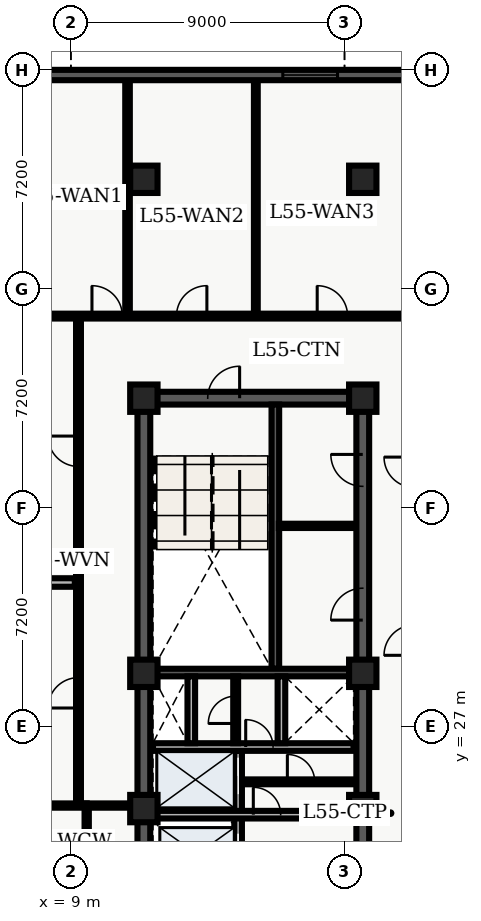
"""IFC4 building model, lengths in metres.
Left out: names, types, materials, properties, quantities, classifications, styles, units other than length and angle.
Written with IfcOpenShell. Run it as: python <this file> out.ifc"""

import sys

from ifc_helpers import new_model, entity, si_unit, converted_unit, direction, frame, origin_with_axes, origin_2d_with_axis, place, context, subcontext, project, spatial, polyline, rectangle, outline, extrude, element, fill, save


model = new_model("IFC4")
c1 = context("Model", 3, precision=1e-05, world=origin_with_axes(), true_north=direction((0.0, 1.0)))
c2 = subcontext(c1, "Body", "Model", "MODEL_VIEW")
j1 = project(units=[si_unit("LENGTHUNIT", "METRE"), converted_unit("PLANEANGLEUNIT", "DEGREE", entity("IfcPlaneAngleMeasure", 0.017), si_unit("PLANEANGLEUNIT", "RADIAN"), dimensions=[0, 0, 0, 0, 0, 0, 0])], contexts=[c1])
p1 = place(None, origin_with_axes())
s1 = spatial("IfcSite", under=j1, at=p1, CompositionType="ELEMENT")
p2 = place(p1, origin_with_axes())
s2 = spatial("IfcBuilding", under=s1, at=p2, CompositionType="ELEMENT")
p3 = place(p2, frame((0.0, 0.0, 224.7), z_axis=(0.0, 0.0, 1.0), x_axis=(1.0, 0.0, 0.0)))
s3 = spatial("IfcBuildingStorey", under=s2, at=p3, CompositionType="ELEMENT", Elevation=224.7)
p4 = place(p3, frame((11.4, 10.8, 0.0), z_axis=(0.0, 0.0, 1.0), x_axis=(0.0, 1.0, 0.0)))
e1 = element("IfcWall", 1, at=p4, inside=s3, PredefinedType="SHEAR", context=c2, shape_type="SweptSolid", body=[
    extrude(outline(polyline([(0.0, -0.21), (27.0, -0.21), (27.0, 0.21), (0.0, 0.21), (0.0, -0.21)])), origin_with_axes(), (0.0, 0.0, 1.0), 3.66),
])
p5 = place(p3, frame((11.4, 37.8, 0.0), z_axis=(0.0, 0.0, 1.0), x_axis=(1.0, 0.0, 0.0)))
e2 = element("IfcWall", 2, at=p5, inside=s3, PredefinedType="SHEAR", context=c2, shape_type="SweptSolid", body=[
    extrude(outline(polyline([(0.0, -0.21), (7.2, -0.21), (7.2, 0.21), (0.0, 0.21), (0.0, -0.21)])), origin_with_axes(), (0.0, 0.0, 1.0), 3.66),
])
p6 = place(p5, frame((2.625, 0.0, 0.0), z_axis=(0.0, 0.0, 1.0), x_axis=(1.0, 0.0, 0.0)))
e3 = element("IfcOpeningElement", 3, at=p6, cuts=e2, PredefinedType="OPENING", context=c2, shape_type="SweptSolid", body=[
    extrude(rectangle(XDim=1.05, YDim=0.44, at=origin_2d_with_axis()), origin_with_axes(), (0.0, 0.0, 1.0), 2.15),
])
p7 = place(p3, frame((18.6, 10.8, 0.0), z_axis=(0.0, 0.0, 1.0), x_axis=(0.0, 1.0, 0.0)))
e4 = element("IfcWall", 4, at=p7, inside=s3, PredefinedType="SHEAR", context=c2, shape_type="SweptSolid", body=[
    extrude(outline(polyline([(0.0, -0.21), (13.5, -0.21), (13.5, 0.21), (0.0, 0.21), (0.0, -0.21)])), origin_with_axes(), (0.0, 0.0, 1.0), 3.66),
])
p8 = place(p7, frame((1.3, 0.0, 0.0), z_axis=(0.0, 0.0, 1.0), x_axis=(1.0, 0.0, 0.0)))
e5 = element("IfcOpeningElement", 5, at=p8, cuts=e4, PredefinedType="OPENING", context=c2, shape_type="SweptSolid", body=[
    extrude(rectangle(XDim=1.1, YDim=0.44, at=origin_2d_with_axis()), origin_with_axes(), (0.0, 0.0, 1.0), 2.15),
])
p9 = place(p7, frame((3.4, 0.0, 0.0), z_axis=(0.0, 0.0, 1.0), x_axis=(1.0, 0.0, 0.0)))
e6 = element("IfcOpeningElement", 6, at=p9, cuts=e4, PredefinedType="OPENING", context=c2, shape_type="SweptSolid", body=[
    extrude(rectangle(XDim=1.1, YDim=0.44, at=origin_2d_with_axis()), origin_with_axes(), (0.0, 0.0, 1.0), 2.15),
])
p10 = place(p7, frame((11.125, 0.0, 0.0), z_axis=(0.0, 0.0, 1.0), x_axis=(1.0, 0.0, 0.0)))
e7 = element("IfcOpeningElement", 7, at=p10, cuts=e4, PredefinedType="OPENING", context=c2, shape_type="SweptSolid", body=[
    extrude(rectangle(XDim=1.05, YDim=0.44, at=origin_2d_with_axis()), origin_with_axes(), (0.0, 0.0, 1.0), 2.15),
])
p11 = place(p7, frame((6.675, 0.0, 0.0), z_axis=(0.0, 0.0, 1.0), x_axis=(1.0, 0.0, 0.0)))
e8 = element("IfcOpeningElement", 8, at=p11, cuts=e4, PredefinedType="OPENING", context=c2, shape_type="SweptSolid", body=[
    extrude(rectangle(XDim=0.95, YDim=0.44, at=origin_2d_with_axis()), origin_with_axes(), (0.0, 0.0, 1.0), 2.15),
])
p12 = place(p3, frame((18.6, 24.3, 0.0), z_axis=(0.0, 0.0, 1.0), x_axis=(0.0, 1.0, 0.0)))
e9 = element("IfcWall", 9, at=p12, inside=s3, PredefinedType="SHEAR", context=c2, shape_type="SweptSolid", body=[
    extrude(outline(polyline([(0.0, -0.21), (13.5, -0.21), (13.5, 0.21), (0.0, 0.21), (0.0, -0.21)])), origin_with_axes(), (0.0, 0.0, 1.0), 3.66),
])
p13 = place(p12, frame((6.725, 0.0, 0.0), z_axis=(0.0, 0.0, 1.0), x_axis=(1.0, 0.0, 0.0)))
e10 = element("IfcOpeningElement", 10, at=p13, cuts=e9, PredefinedType="OPENING", context=c2, shape_type="SweptSolid", body=[
    extrude(rectangle(XDim=1.05, YDim=0.44, at=origin_2d_with_axis()), origin_with_axes(), (0.0, 0.0, 1.0), 2.15),
])
p14 = place(p12, frame((11.125, 0.0, 0.0), z_axis=(0.0, 0.0, 1.0), x_axis=(1.0, 0.0, 0.0)))
e11 = element("IfcOpeningElement", 11, at=p14, cuts=e9, PredefinedType="OPENING", context=c2, shape_type="SweptSolid", body=[
    extrude(rectangle(XDim=1.05, YDim=0.44, at=origin_2d_with_axis()), origin_with_axes(), (0.0, 0.0, 1.0), 2.15),
])
p15 = place(p3, frame((15.725, 28.9, 0.0), z_axis=(0.0, 0.0, 1.0), x_axis=(0.0, 1.0, 0.0)))
e12 = element("IfcWall", 12, at=p15, inside=s3, PredefinedType="SHEAR", context=c2, shape_type="SweptSolid", body=[
    extrude(outline(polyline([(0.0, -0.125), (8.69, -0.125), (8.69, 0.125), (0.0, 0.125), (0.0, -0.125)])), origin_with_axes(), (0.0, 0.0, 1.0), 3.66),
])
p16 = place(p3, frame((11.61, 28.775, 0.0), z_axis=(0.0, 0.0, 1.0), x_axis=(1.0, 0.0, 0.0)))
e13 = element("IfcWall", 13, at=p16, inside=s3, PredefinedType="SHEAR", context=c2, shape_type="SweptSolid", body=[
    extrude(outline(polyline([(0.0, -0.125), (6.78, -0.125), (6.78, 0.125), (0.0, 0.125), (0.0, -0.125)])), origin_with_axes(), (0.0, 0.0, 1.0), 3.66),
])
p17 = place(p3, frame((14.5, 19.95, 0.0), z_axis=(0.0, 0.0, 1.0), x_axis=(0.0, 1.0, 0.0)))
e14 = element("IfcWall", 14, at=p17, inside=s3, PredefinedType="SOLIDWALL", context=c2, shape_type="SweptSolid", body=[
    extrude(outline(polyline([(0.0, -0.125), (6.25, -0.125), (6.25, 0.125), (0.0, 0.125), (0.0, -0.125)])), origin_with_axes(), (0.0, 0.0, 1.0), 2.7),
])
p18 = place(p17, frame((1.025, 0.0, 0.0), z_axis=(0.0, 0.0, 1.0), x_axis=(1.0, 0.0, 0.0)))
e15 = element("IfcOpeningElement", 15, at=p18, cuts=e14, PredefinedType="OPENING", context=c2, shape_type="SweptSolid", body=[
    extrude(rectangle(XDim=1.1, YDim=0.27, at=origin_2d_with_axis()), origin_with_axes(), (0.0, 0.0, 1.0), 2.15),
])
p19 = place(p17, frame((2.975, 0.0, 0.0), z_axis=(0.0, 0.0, 1.0), x_axis=(1.0, 0.0, 0.0)))
e16 = element("IfcOpeningElement", 16, at=p19, cuts=e14, PredefinedType="OPENING", context=c2, shape_type="SweptSolid", body=[
    extrude(rectangle(XDim=1.1, YDim=0.27, at=origin_2d_with_axis()), origin_with_axes(), (0.0, 0.0, 1.0), 2.15),
])
p20 = place(p17, frame((5.425, 0.0, 0.0), z_axis=(0.0, 0.0, 1.0), x_axis=(1.0, 0.0, 0.0)))
e17 = element("IfcOpeningElement", 17, at=p20, cuts=e14, PredefinedType="OPENING", context=c2, shape_type="SweptSolid", body=[
    extrude(rectangle(XDim=1.2, YDim=0.27, at=origin_2d_with_axis()), origin_with_axes(), (0.0, 0.0, 1.0), 2.15),
])
p21 = place(p3, frame((11.7, 24.1, 0.0), z_axis=(0.0, 0.0, 1.0), x_axis=(1.0, 0.0, 0.0)))
e18 = element("IfcWall", 18, at=p21, inside=s3, PredefinedType="SOLIDWALL", context=c2, shape_type="SweptSolid", body=[
    extrude(outline(polyline([(0.0, -0.125), (6.6, -0.125), (6.6, 0.125), (0.0, 0.125), (0.0, -0.125)])), origin_with_axes(), (0.0, 0.0, 1.0), 2.7),
])
p22 = place(p21, frame((3.75, 0.0, 0.0), z_axis=(0.0, 0.0, 1.0), x_axis=(1.0, 0.0, 0.0)))
e19 = element("IfcOpeningElement", 19, at=p22, cuts=e18, PredefinedType="OPENING", context=c2, shape_type="SweptSolid", body=[
    extrude(rectangle(XDim=0.9, YDim=0.27, at=origin_2d_with_axis()), origin_with_axes(), (0.0, 0.0, 1.0), 2.15),
])
p23 = place(p3, frame((11.7, 26.325, 0.0), z_axis=(0.0, 0.0, 1.0), x_axis=(1.0, 0.0, 0.0)))
e20 = element("IfcWall", 20, at=p23, inside=s3, PredefinedType="SOLIDWALL", context=c2, shape_type="SweptSolid", body=[
    extrude(outline(polyline([(0.0, -0.125), (6.6, -0.125), (6.6, 0.125), (0.0, 0.125), (0.0, -0.125)])), origin_with_axes(), (0.0, 0.0, 1.0), 2.7),
])
p24 = place(p23, frame((3.5, 0.0, 0.0), z_axis=(0.0, 0.0, 1.0), x_axis=(1.0, 0.0, 0.0)))
e21 = element("IfcOpeningElement", 21, at=p24, cuts=e20, PredefinedType="OPENING", context=c2, shape_type="SweptSolid", body=[
    extrude(rectangle(XDim=0.9, YDim=0.27, at=origin_2d_with_axis()), origin_with_axes(), (0.0, 0.0, 1.0), 2.15),
])
for number, where, z_axis, x_axis in (
    (22, (12.96, 26.45, 0.0), (0.0, 0.0, 1.0), (0.0, 1.0, 0.0)),
    (23, (15.925, 26.45, 0.0), (0.0, 0.0, 1.0), (0.0, 1.0, 0.0)),
):
    element("IfcWall", number, at=place(p3, frame(where, z_axis=z_axis, x_axis=x_axis)), inside=s3, PredefinedType="SOLIDWALL", context=c2, shape_type="SweptSolid", body=[
        extrude(outline(polyline([(0.0, -0.125), (2.2, -0.125), (2.2, 0.125), (0.0, 0.125), (0.0, -0.125)])), origin_with_axes(), (0.0, 0.0, 1.0), 2.7),
    ])
for number, where, z_axis, x_axis in (
    (24, (11.4, 24.3, 0.0), (0.0, 0.0, 1.0), (1.0, 0.0, 0.0)),
    (25, (11.4, 28.75, 0.0), (0.0, 0.0, 1.0), (1.0, 0.0, 0.0)),
    (26, (11.4, 37.8, 0.0), (0.0, 0.0, 1.0), (1.0, 0.0, 0.0)),
    (27, (11.4, 45.0, 0.0), (0.0, 0.0, 1.0), (1.0, 0.0, 0.0)),
    (28, (18.6, 24.3, 0.0), (0.0, 0.0, 1.0), (1.0, 0.0, 0.0)),
    (29, (18.6, 28.75, 0.0), (0.0, 0.0, 1.0), (1.0, 0.0, 0.0)),
    (30, (18.6, 37.8, 0.0), (0.0, 0.0, 1.0), (1.0, 0.0, 0.0)),
    (31, (18.6, 45.0, 0.0), (0.0, 0.0, 1.0), (1.0, 0.0, 0.0)),
):
    element("IfcColumn", number, at=place(p3, frame(where, z_axis=z_axis, x_axis=x_axis)), inside=s3, PredefinedType="COLUMN", context=c2, shape_type="SweptSolid", body=[
        extrude(rectangle(XDim=0.9, YDim=0.9, at=origin_2d_with_axis()), origin_with_axes(), (0.0, 0.0, 1.0), 3.9),
    ])
p25 = place(p3, frame((14.62, 25.18, 0.0), z_axis=(0.0, 0.0, 1.0), x_axis=(1.0, 0.0, 0.0)))
e32 = element("IfcWall", 32, at=p25, inside=s3, PredefinedType="PARTITIONING", context=c2, shape_type="SweptSolid", body=[
    extrude(outline(polyline([(0.0, -0.08), (3.68, -0.08), (3.68, 0.08), (0.0, 0.08), (0.0, -0.08)])), origin_with_axes(), (0.0, 0.0, 1.0), 2.7),
])
p26 = place(p25, frame((1.95, 0.0, 0.0), z_axis=(0.0, 0.0, 1.0), x_axis=(1.0, 0.0, 0.0)))
e33 = element("IfcOpeningElement", 33, at=p26, cuts=e32, PredefinedType="OPENING", context=c2, shape_type="SweptSolid", body=[
    extrude(rectangle(XDim=0.9, YDim=0.18, at=origin_2d_with_axis()), origin_with_axes(), (0.0, 0.0, 1.0), 2.15),
])
p27 = place(p3, frame((14.42, 26.45, 0.0), z_axis=(0.0, 0.0, 1.0), x_axis=(0.0, 1.0, 0.0)))
e34 = element("IfcWall", 34, at=p27, inside=s3, PredefinedType="PARTITIONING", context=c2, shape_type="SweptSolid", body=[
    extrude(outline(polyline([(0.0, -0.08), (2.2, -0.08), (2.2, 0.08), (0.0, 0.08), (0.0, -0.08)])), origin_with_axes(), (0.0, 0.0, 1.0), 2.7),
])
p28 = place(p27, frame((1.1, 0.0, 0.0), z_axis=(0.0, 0.0, 1.0), x_axis=(1.0, 0.0, 0.0)))
e35 = element("IfcOpeningElement", 35, at=p28, cuts=e34, PredefinedType="OPENING", context=c2, shape_type="SweptSolid", body=[
    extrude(rectangle(XDim=0.9, YDim=0.18, at=origin_2d_with_axis()), origin_with_axes(), (0.0, 0.0, 1.0), 2.15),
])
p29 = place(p3, frame((15.84, 33.6, 0.0), z_axis=(0.0, 0.0, 1.0), x_axis=(1.0, 0.0, 0.0)))
e36 = element("IfcWall", 36, at=p29, inside=s3, PredefinedType="PARTITIONING", context=c2, shape_type="SweptSolid", body=[
    extrude(outline(polyline([(0.0, -0.07), (2.46, -0.07), (2.46, 0.07), (0.0, 0.07), (0.0, -0.07)])), origin_with_axes(), (0.0, 0.0, 1.0), 2.7),
])
p30 = place(p3, frame((9.52, 20.4, 0.0), z_axis=(0.0, 0.0, 1.0), x_axis=(0.0, 1.0, 0.0)))
e37 = element("IfcWall", 37, at=p30, inside=s3, PredefinedType="PARTITIONING", context=c2, shape_type="SweptSolid", body=[
    extrude(outline(polyline([(0.0, -0.07), (4.0, -0.07), (4.0, 0.07), (0.0, 0.07), (0.0, -0.07)])), origin_with_axes(), (0.0, 0.0, 1.0), 2.7),
])
p31 = place(p3, frame((9.52, 24.4, 0.0), z_axis=(0.0, 0.0, 1.0), x_axis=(1.0, 0.0, 0.0)))
e38 = element("IfcWall", 38, at=p31, inside=s3, PredefinedType="PARTITIONING", context=c2, shape_type="SweptSolid", body=[
    extrude(outline(polyline([(0.0, -0.07), (1.58, -0.07), (1.58, 0.07), (0.0, 0.07), (0.0, -0.07)])), origin_with_axes(), (0.0, 0.0, 1.0), 2.7),
])
p32 = place(p3, frame((7.1, 40.5, 0.0), z_axis=(0.0, 0.0, 1.0), x_axis=(1.0, 0.0, 0.0)))
e39 = element("IfcWall", 39, at=p32, inside=s3, PredefinedType="PARTITIONING", context=c2, shape_type="SweptSolid", body=[
    extrude(outline(polyline([(0.0, -0.08), (24.965, -0.08), (24.965, 0.08), (0.0, 0.08), (0.0, -0.08)])), origin_with_axes(), (0.0, 0.0, 1.0), 2.7),
])
p33 = place(p32, frame((3.093, 0.0, 0.0), z_axis=(0.0, 0.0, 1.0), x_axis=(1.0, 0.0, 0.0)))
e40 = element("IfcOpeningElement", 40, at=p33, cuts=e39, PredefinedType="OPENING", context=c2, shape_type="SweptSolid", body=[
    extrude(rectangle(XDim=1.0, YDim=0.18, at=origin_2d_with_axis()), origin_with_axes(), (0.0, 0.0, 1.0), 2.15),
])
p34 = place(p32, frame((5.873, 0.0, 0.0), z_axis=(0.0, 0.0, 1.0), x_axis=(1.0, 0.0, 0.0)))
e41 = element("IfcOpeningElement", 41, at=p34, cuts=e39, PredefinedType="OPENING", context=c2, shape_type="SweptSolid", body=[
    extrude(rectangle(XDim=1.0, YDim=0.18, at=origin_2d_with_axis()), origin_with_axes(), (0.0, 0.0, 1.0), 2.15),
])
p35 = place(p32, frame((10.502, 0.0, 0.0), z_axis=(0.0, 0.0, 1.0), x_axis=(1.0, 0.0, 0.0)))
e42 = element("IfcOpeningElement", 42, at=p35, cuts=e39, PredefinedType="OPENING", context=c2, shape_type="SweptSolid", body=[
    extrude(rectangle(XDim=1.0, YDim=0.18, at=origin_2d_with_axis()), origin_with_axes(), (0.0, 0.0, 1.0), 2.15),
])
p36 = place(p3, frame((9.25, 24.4, 0.0), z_axis=(0.0, 0.0, 1.0), x_axis=(0.0, 1.0, 0.0)))
e43 = element("IfcWall", 43, at=p36, inside=s3, PredefinedType="PARTITIONING", context=c2, shape_type="SweptSolid", body=[
    extrude(outline(polyline([(0.0, -0.08), (16.1, -0.08), (16.1, 0.08), (0.0, 0.08), (0.0, -0.08)])), origin_with_axes(), (0.0, 0.0, 1.0), 2.7),
])
p37 = place(p36, frame((3.708, 0.0, 0.0), z_axis=(0.0, 0.0, 1.0), x_axis=(1.0, 0.0, 0.0)))
e44 = element("IfcOpeningElement", 44, at=p37, cuts=e43, PredefinedType="OPENING", context=c2, shape_type="SweptSolid", body=[
    extrude(rectangle(XDim=1.0, YDim=0.18, at=origin_2d_with_axis()), origin_with_axes(), (0.0, 0.0, 1.0), 2.15),
])
p38 = place(p36, frame((11.653, 0.0, 0.0), z_axis=(0.0, 0.0, 1.0), x_axis=(1.0, 0.0, 0.0)))
e45 = element("IfcOpeningElement", 45, at=p38, cuts=e43, PredefinedType="OPENING", context=c2, shape_type="SweptSolid", body=[
    extrude(rectangle(XDim=1.0, YDim=0.18, at=origin_2d_with_axis()), origin_with_axes(), (0.0, 0.0, 1.0), 2.15),
])
p39 = place(p3, frame((4.835, 24.4, 0.0), z_axis=(0.0, 0.0, 1.0), x_axis=(1.0, 0.0, 0.0)))
e46 = element("IfcWall", 46, at=p39, inside=s3, PredefinedType="PARTITIONING", context=c2, shape_type="SweptSolid", body=[
    extrude(outline(polyline([(0.0, -0.07), (4.685, -0.07), (4.685, 0.07), (0.0, 0.07), (0.0, -0.07)])), origin_with_axes(), (0.0, 0.0, 1.0), 2.7),
])
p40 = place(p3, frame((4.835, 31.737, 0.0), z_axis=(0.0, 0.0, 1.0), x_axis=(1.0, 0.0, 0.0)))
e47 = element("IfcWall", 47, at=p40, inside=s3, PredefinedType="PARTITIONING", context=c2, shape_type="SweptSolid", body=[
    extrude(outline(polyline([(0.0, -0.14), (4.295, -0.14), (4.295, 0.14), (0.0, 0.14), (0.0, -0.14)])), origin_with_axes(), (0.0, 0.0, 1.0), 2.7),
])
p41 = place(p3, frame((10.863, 40.6, 0.0), z_axis=(0.0, 0.0, 1.0), x_axis=(0.0, 1.0, 0.0)))
e48 = element("IfcWall", 48, at=p41, inside=s3, PredefinedType="PARTITIONING", context=c2, shape_type="SweptSolid", body=[
    extrude(outline(polyline([(0.0, -0.075), (7.665, -0.075), (7.665, 0.075), (0.0, 0.075), (0.0, -0.075)])), origin_with_axes(), (0.0, 0.0, 1.0), 2.7),
])
p42 = place(p3, frame((15.083, 40.6, 0.0), z_axis=(0.0, 0.0, 1.0), x_axis=(0.0, 1.0, 0.0)))
e49 = element("IfcWall", 49, at=p42, inside=s3, PredefinedType="PARTITIONING", context=c2, shape_type="SweptSolid", body=[
    extrude(outline(polyline([(0.0, -0.062), (7.665, -0.062), (7.665, 0.062), (0.0, 0.062), (0.0, -0.062)])), origin_with_axes(), (0.0, 0.0, 1.0), 2.7),
])
p43 = place(p3, frame((7.24, 48.43, 0.0), z_axis=(0.0, 0.0, 1.0), x_axis=(1.0, 0.0, 0.0)))
e50 = element("IfcWall", 50, at=p43, inside=s3, PredefinedType="SOLIDWALL", context=c2, shape_type="SweptSolid", body=[
    extrude(outline(polyline([(0.0, -0.17), (18.36, -0.17), (18.36, 0.17), (0.0, 0.17), (0.0, -0.17)])), origin_with_axes(), (0.0, 0.0, 1.0), 3.66),
])
p44 = place(p43, frame((9.63, 0.0, 0.45), z_axis=(0.0, 0.0, 1.0), x_axis=(1.0, 0.0, 0.0)))
e51 = element("IfcOpeningElement", 51, at=p44, cuts=e50, PredefinedType="OPENING", context=c2, shape_type="SweptSolid", body=[
    extrude(rectangle(XDim=1.8, YDim=0.36, at=origin_2d_with_axis()), origin_with_axes(), (0.0, 0.0, 1.0), 2.1),
])
p45 = place(p43, frame((14.9, 0.0, 0.45), z_axis=(0.0, 0.0, 1.0), x_axis=(1.0, 0.0, 0.0)))
e52 = element("IfcOpeningElement", 52, at=p45, cuts=e50, PredefinedType="OPENING", context=c2, shape_type="SweptSolid", body=[
    extrude(rectangle(XDim=1.8, YDim=0.36, at=origin_2d_with_axis()), origin_with_axes(), (0.0, 0.0, 1.0), 2.1),
])
p46 = place(p17, frame((2.975, 0.0, 0.0), z_axis=(0.0, 0.0, 1.0), x_axis=(1.0, 0.0, 0.0)))
e53 = element("IfcDoor", 53, at=p46, inside=s3, OperationType="SLIDING_TO_RIGHT", PredefinedType="DOOR", context=c2, shape_type="SweptSolid", body=[
    extrude(rectangle(XDim=1.1, YDim=0.09, at=origin_2d_with_axis()), origin_with_axes(), (0.0, 0.0, 1.0), 2.15),
])
fill(e16, e53)
p47 = place(p17, frame((5.425, 0.0, 0.0), z_axis=(0.0, 0.0, 1.0), x_axis=(1.0, 0.0, 0.0)))
e54 = element("IfcDoor", 54, at=p47, inside=s3, OperationType="DOUBLE_DOOR_SLIDING", PredefinedType="DOOR", context=c2, shape_type="SweptSolid", body=[
    extrude(rectangle(XDim=1.2, YDim=0.09, at=origin_2d_with_axis()), origin_with_axes(), (0.0, 0.0, 1.0), 2.15),
])
fill(e17, e54)
p48 = place(p5, frame((2.625, 0.0, 0.0), z_axis=(0.0, 0.0, 1.0), x_axis=(1.0, 0.0, 0.0)))
e55 = element("IfcDoor", 55, at=p48, inside=s3, OperationType="SINGLE_SWING_RIGHT", PredefinedType="DOOR", context=c2, shape_type="SweptSolid", body=[
    extrude(rectangle(XDim=1.05, YDim=0.09, at=origin_2d_with_axis()), origin_with_axes(), (0.0, 0.0, 1.0), 2.15),
])
fill(e3, e55)
p49 = place(p23, frame((3.5, 0.0, 0.0), z_axis=(0.0, 0.0, 1.0), x_axis=(1.0, 0.0, 0.0)))
e56 = element("IfcDoor", 56, at=p49, inside=s3, OperationType="SINGLE_SWING_LEFT", PredefinedType="DOOR", context=c2, shape_type="SweptSolid", body=[
    extrude(rectangle(XDim=0.9, YDim=0.09, at=origin_2d_with_axis()), origin_with_axes(), (0.0, 0.0, 1.0), 2.15),
])
fill(e21, e56)
p50 = place(p27, frame((1.1, 0.0, 0.0), z_axis=(0.0, 0.0, 1.0), x_axis=(1.0, 0.0, 0.0)))
e57 = element("IfcDoor", 57, at=p50, inside=s3, OperationType="SINGLE_SWING_LEFT", PredefinedType="DOOR", context=c2, shape_type="SweptSolid", body=[
    extrude(rectangle(XDim=0.9, YDim=0.09, at=origin_2d_with_axis()), origin_with_axes(), (0.0, 0.0, 1.0), 2.15),
])
fill(e35, e57)
p51 = place(p21, frame((3.75, 0.0, 0.0), z_axis=(0.0, 0.0, 1.0), x_axis=(1.0, 0.0, 0.0)))
e58 = element("IfcDoor", 58, at=p51, inside=s3, OperationType="SINGLE_SWING_LEFT", PredefinedType="DOOR", context=c2, shape_type="SweptSolid", body=[
    extrude(rectangle(XDim=0.9, YDim=0.09, at=origin_2d_with_axis()), origin_with_axes(), (0.0, 0.0, 1.0), 2.15),
])
fill(e19, e58)
p52 = place(p25, frame((1.95, 0.0, 0.0), z_axis=(0.0, 0.0, 1.0), x_axis=(1.0, 0.0, 0.0)))
e59 = element("IfcDoor", 59, at=p52, inside=s3, OperationType="SINGLE_SWING_LEFT", PredefinedType="DOOR", context=c2, shape_type="SweptSolid", body=[
    extrude(rectangle(XDim=0.9, YDim=0.09, at=origin_2d_with_axis()), origin_with_axes(), (0.0, 0.0, 1.0), 2.15),
])
fill(e33, e59)
p53 = place(p12, frame((6.725, 0.0, 0.0), z_axis=(0.0, 0.0, 1.0), x_axis=(1.0, 0.0, 0.0)))
e60 = element("IfcDoor", 60, at=p53, inside=s3, OperationType="SINGLE_SWING_LEFT", PredefinedType="DOOR", context=c2, shape_type="SweptSolid", body=[
    extrude(rectangle(XDim=1.05, YDim=0.09, at=origin_2d_with_axis()), origin_with_axes(), (0.0, 0.0, 1.0), 2.15),
])
fill(e10, e60)
p54 = place(p12, frame((11.125, 0.0, 0.0), z_axis=(0.0, 0.0, 1.0), x_axis=(1.0, 0.0, 0.0)))
e61 = element("IfcDoor", 61, at=p54, inside=s3, OperationType="SINGLE_SWING_RIGHT", PredefinedType="DOOR", context=c2, shape_type="SweptSolid", body=[
    extrude(rectangle(XDim=1.05, YDim=0.09, at=origin_2d_with_axis()), origin_with_axes(), (0.0, 0.0, 1.0), 2.15),
])
fill(e11, e61)
p55 = place(p36, frame((3.708, 0.0, 0.0), z_axis=(0.0, 0.0, 1.0), x_axis=(1.0, 0.0, 0.0)))
e62 = element("IfcDoor", 62, at=p55, inside=s3, OperationType="SINGLE_SWING_LEFT", PredefinedType="DOOR", context=c2, shape_type="SweptSolid", body=[
    extrude(rectangle(XDim=1.0, YDim=0.09, at=origin_2d_with_axis()), origin_with_axes(), (0.0, 0.0, 1.0), 2.15),
])
fill(e44, e62)
p56 = place(p36, frame((11.653, 0.0, 0.0), z_axis=(0.0, 0.0, 1.0), x_axis=(1.0, 0.0, 0.0)))
e63 = element("IfcDoor", 63, at=p56, inside=s3, OperationType="SINGLE_SWING_RIGHT", PredefinedType="DOOR", context=c2, shape_type="SweptSolid", body=[
    extrude(rectangle(XDim=1.0, YDim=0.09, at=origin_2d_with_axis()), origin_with_axes(), (0.0, 0.0, 1.0), 2.15),
])
fill(e45, e63)
p57 = place(p32, frame((3.093, 0.0, 0.0), z_axis=(0.0, 0.0, 1.0), x_axis=(1.0, 0.0, 0.0)))
e64 = element("IfcDoor", 64, at=p57, inside=s3, OperationType="SINGLE_SWING_LEFT", PredefinedType="DOOR", context=c2, shape_type="SweptSolid", body=[
    extrude(rectangle(XDim=1.0, YDim=0.09, at=origin_2d_with_axis()), origin_with_axes(), (0.0, 0.0, 1.0), 2.15),
])
fill(e40, e64)
p58 = place(p32, frame((5.873, 0.0, 0.0), z_axis=(0.0, 0.0, 1.0), x_axis=(1.0, 0.0, 0.0)))
e65 = element("IfcDoor", 65, at=p58, inside=s3, OperationType="SINGLE_SWING_RIGHT", PredefinedType="DOOR", context=c2, shape_type="SweptSolid", body=[
    extrude(rectangle(XDim=1.0, YDim=0.09, at=origin_2d_with_axis()), origin_with_axes(), (0.0, 0.0, 1.0), 2.15),
])
fill(e41, e65)
p59 = place(p32, frame((10.502, 0.0, 0.0), z_axis=(0.0, 0.0, 1.0), x_axis=(1.0, 0.0, 0.0)))
e66 = element("IfcDoor", 66, at=p59, inside=s3, OperationType="SINGLE_SWING_LEFT", PredefinedType="DOOR", context=c2, shape_type="SweptSolid", body=[
    extrude(rectangle(XDim=1.0, YDim=0.09, at=origin_2d_with_axis()), origin_with_axes(), (0.0, 0.0, 1.0), 2.15),
])
fill(e42, e66)
p60 = place(p43, frame((9.63, 0.0, 0.45), z_axis=(0.0, 0.0, 1.0), x_axis=(1.0, 0.0, 0.0)))
e67 = element("IfcWindow", 67, at=p60, inside=s3, PredefinedType="WINDOW", context=c2, shape_type="SweptSolid", body=[
    extrude(rectangle(XDim=1.8, YDim=0.09, at=origin_2d_with_axis()), origin_with_axes(), (0.0, 0.0, 1.0), 2.1),
])
fill(e51, e67)
save(model, sys.argv[1])
